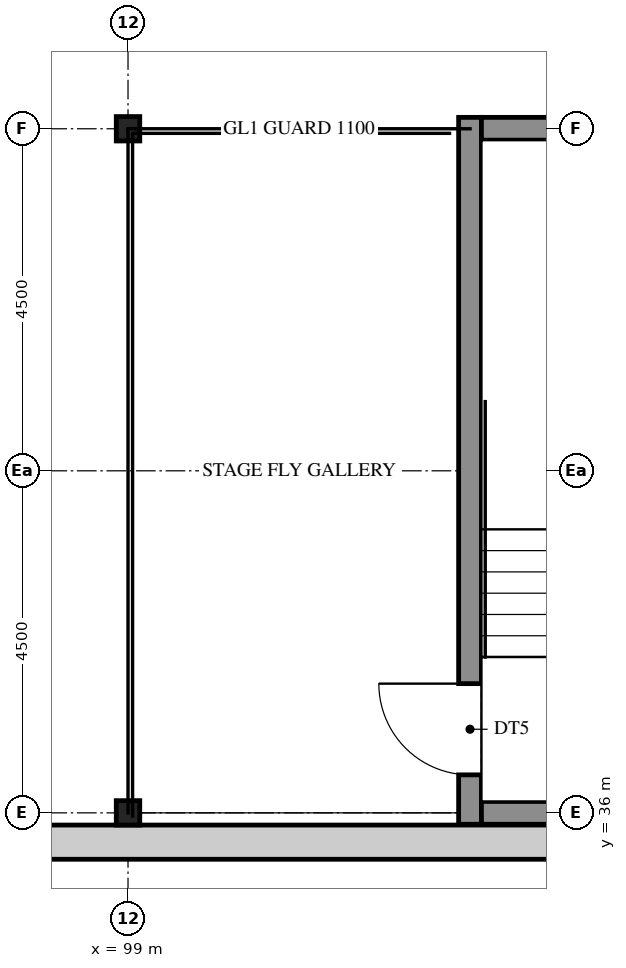
"""IFC4 building model, lengths in metres.
Left out: names, types, materials, properties, quantities, classifications, styles, units other than length and angle.
Written with IfcOpenShell. Run it as: python <this file> out.ifc"""

import sys

from ifc_helpers import new_model, si_unit, direction, frame, frame_2d, origin, origin_2d, place, context, subcontext, project, spatial, rectangle, i_section, extrude, element, fill, save


model = new_model("IFC4")
c1 = context("Model", 3, precision=1e-05, world=origin(), true_north=direction((0.0, 1.0)))
c2 = subcontext(c1, "Body", "Model", "MODEL_VIEW")
j1 = project(units=[si_unit("LENGTHUNIT", "METRE"), si_unit("PLANEANGLEUNIT", "RADIAN")], contexts=[c1])
p1 = place(None, origin())
s1 = spatial("IfcSite", under=j1, at=p1, CompositionType="ELEMENT")
p2 = place(p1, origin())
s2 = spatial("IfcBuilding", under=s1, at=p2, CompositionType="ELEMENT")
p3 = place(p2, frame((0.0, 0.0, 6.0)))
s3 = spatial("IfcBuildingStorey", under=s2, at=p3, CompositionType="ELEMENT", Elevation=6.0)
for number, where, z_axis, x_axis in (
    (1, (99.0, 36.0, 0.0), (0.0, 0.0, 1.0), (1.0, 0.0, 0.0)),
    (2, (99.0, 45.0, 0.0), (0.0, 0.0, 1.0), (1.0, 0.0, 0.0)),
):
    element("IfcColumn", number, at=place(p3, frame(where, z_axis=z_axis, x_axis=x_axis)), inside=s3, PredefinedType="COLUMN", context=c2, shape_type="SweptSolid", body=[
        extrude(i_section(OverallWidth=0.309, OverallDepth=0.321, WebThickness=0.014, FlangeThickness=0.022, FilletRadius=0.017, at=origin_2d()), origin(), (0.0, 0.0, 1.0), 4.5),
    ])
p4 = place(p3, frame((103.5, 35.85, 0.0), z_axis=(0.0, 0.0, 1.0), x_axis=(0.0, 1.0, 0.0)))
e3 = element("IfcWall", 3, at=p4, inside=s3, PredefinedType="SHEAR", context=c2, shape_type="SweptSolid", body=[
    extrude(rectangle(XDim=9.3, YDim=0.3, at=frame_2d((4.65, 0.0))), origin(), (0.0, 0.0, 1.0), 4.5),
])
p5 = place(p4, frame((0.65, 0.0, 0.0)))
e4 = element("IfcOpeningElement", 4, at=p5, cuts=e3, PredefinedType="OPENING", context=c2, shape_type="SweptSolid", body=[
    extrude(rectangle(XDim=1.2, YDim=2.1, at=frame_2d((0.6, 1.05))), frame((0.0, 0.16, 0.0), z_axis=(0.0, -1.0, 0.0), x_axis=(1.0, 0.0, 0.0)), (0.0, 0.0, 1.0), 0.32),
])
for number, where, z_axis, x_axis in (
    (5, (103.65, 36.0, 0.0), (0.0, 0.0, 1.0), (1.0, 0.0, 0.0)),
    (6, (103.65, 45.0, 0.0), (0.0, 0.0, 1.0), (1.0, 0.0, 0.0)),
):
    element("IfcWall", number, at=place(p3, frame(where, z_axis=z_axis, x_axis=x_axis)), inside=s3, PredefinedType="SHEAR", context=c2, shape_type="SweptSolid", body=[
        extrude(rectangle(XDim=4.2, YDim=0.3, at=frame_2d((2.1, 0.0))), origin(), (0.0, 0.0, 1.0), 4.5),
    ])
p6 = place(p3, frame((108.604, 35.615, 0.0), z_axis=(0.0, 0.0, 1.0), x_axis=(-1.0, 0.0, 0.0)))
e7 = element("IfcWall", 7, at=p6, inside=s3, PredefinedType="STANDARD", context=c2, shape_type="SweptSolid", body=[
    extrude(rectangle(XDim=18.604, YDim=0.45, at=frame_2d((9.302, 0.0))), origin(), (0.0, 0.0, 1.0), 4.5),
])
p7 = place(p5, frame((1.2, 0.0, 0.0), z_axis=(0.0, 0.0, 1.0), x_axis=(-1.0, 0.0, 0.0)))
e8 = element("IfcDoor", 8, at=p7, inside=s3, OperationType="SINGLE_SWING_RIGHT", PredefinedType="DOOR", context=c2, shape_type="SweptSolid", body=[
    extrude(rectangle(XDim=1.2, YDim=2.1, at=frame_2d((0.6, 1.05))), frame((0.0, 0.025, 0.0), z_axis=(0.0, -1.0, 0.0), x_axis=(1.0, 0.0, 0.0)), (0.0, 0.0, 1.0), 0.05),
])
fill(e4, e8)
save(model, sys.argv[1])
